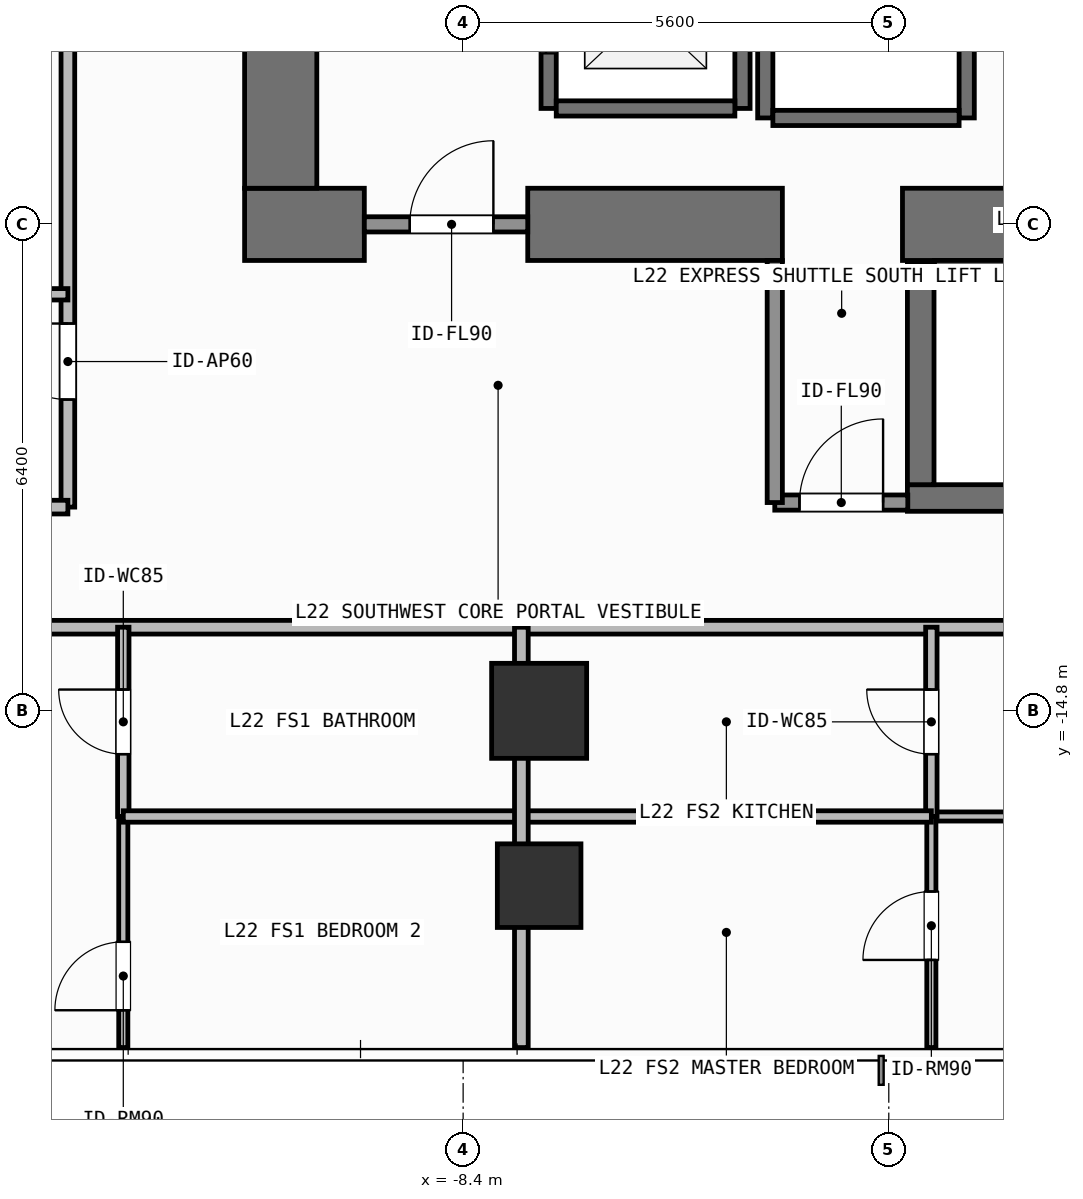
"""IFC4 building model, lengths in metres.
Left out: names, types, materials, properties, quantities, classifications, styles, units other than length and angle.
Written with IfcOpenShell. Run it as: python <this file> out.ifc"""

import sys

from ifc_helpers import new_model, si_unit, direction, frame, frame_2d, origin, origin_2d, place, context, subcontext, project, spatial, rectangle, extrude, element, fill, save


model = new_model("IFC4")
c1 = context("Model", 3, precision=1e-05, world=origin(), true_north=direction((0.0, 1.0)))
c2 = subcontext(c1, "Body", "Model", "MODEL_VIEW")
j1 = project(units=[si_unit("LENGTHUNIT", "METRE"), si_unit("PLANEANGLEUNIT", "RADIAN")], contexts=[c1])
p1 = place(None, origin())
s1 = spatial("IfcSite", under=j1, at=p1, CompositionType="ELEMENT")
p2 = place(p1, origin())
s2 = spatial("IfcBuilding", under=s1, at=p2, CompositionType="ELEMENT")
p3 = place(p2, frame((0.0, 0.0, 89.1)))
s3 = spatial("IfcBuildingStorey", under=s2, at=p3, CompositionType="ELEMENT", Elevation=89.1)
p4 = place(p3, frame((-11.275, -8.4, 0.0), z_axis=(0.0, 0.0, 1.0), x_axis=(1.0, 0.0, 0.0)))
e1 = element("IfcWall", 1, at=p4, inside=s3, PredefinedType="SHEAR", context=c2, shape_type="SweptSolid", body=[
    extrude(rectangle(XDim=1.575, YDim=0.95, at=frame_2d((0.788, 0.0))), origin(), (0.0, 0.0, 1.0), 3.9),
])
p5 = place(p3, frame((-7.55, -8.4, 0.0), z_axis=(0.0, 0.0, 1.0), x_axis=(1.0, 0.0, 0.0)))
e2 = element("IfcWall", 2, at=p5, inside=s3, PredefinedType="SHEAR", context=c2, shape_type="SweptSolid", body=[
    extrude(rectangle(XDim=3.35, YDim=0.95, at=frame_2d((1.675, 0.0))), origin(), (0.0, 0.0, 1.0), 3.9),
])
p6 = place(p3, frame((-2.62, -8.4, 0.0), z_axis=(0.0, 0.0, 1.0), x_axis=(1.0, 0.0, 0.0)))
e3 = element("IfcWall", 3, at=p6, inside=s3, PredefinedType="SHEAR", context=c2, shape_type="SweptSolid", body=[
    extrude(rectangle(XDim=7.27, YDim=0.95, at=frame_2d((3.635, 0.0))), origin(), (0.0, 0.0, 1.0), 3.9),
])
p7 = place(p3, frame((-10.8, -7.925, 0.0), z_axis=(0.0, 0.0, 1.0), x_axis=(0.0, 1.0, 0.0)))
e4 = element("IfcWall", 4, at=p7, inside=s3, PredefinedType="SHEAR", context=c2, shape_type="SweptSolid", body=[
    extrude(rectangle(XDim=15.85, YDim=0.95, at=frame_2d((7.925, 0.0))), origin(), (0.0, 0.0, 1.0), 3.9),
])
p8 = place(p3, frame((-2.555, -12.0, 0.0), z_axis=(0.0, 0.0, 1.0), x_axis=(1.0, 0.0, 0.0)))
e5 = element("IfcWall", 5, at=p8, inside=s3, PredefinedType="SHEAR", context=c2, shape_type="SweptSolid", body=[
    extrude(rectangle(XDim=7.31, YDim=0.35, at=frame_2d((3.655, 0.0))), origin(), (0.0, 0.0, 1.0), 3.9),
])
p9 = place(p3, frame((-2.2, -8.95, 0.0), z_axis=(0.0, 0.0, 1.0), x_axis=(1.0, 0.0, 0.0)))
e6 = element("IfcWall", 6, at=p9, inside=s3, PredefinedType="SHEAR", context=c2, shape_type="SweptSolid", body=[
    extrude(rectangle(XDim=6.6, YDim=0.15, at=frame_2d((3.3, 0.0))), origin(), (0.0, 0.0, 1.0), 3.9),
])
p10 = place(p3, frame((-2.38, -11.825, 0.0), z_axis=(0.0, 0.0, 1.0), x_axis=(0.0, 1.0, 0.0)))
e7 = element("IfcWall", 7, at=p10, inside=s3, PredefinedType="SHEAR", context=c2, shape_type="SweptSolid", body=[
    extrude(rectangle(XDim=2.925, YDim=0.35, at=frame_2d((1.462, 0.0))), origin(), (0.0, 0.0, 1.0), 3.9),
])
p11 = place(p3, frame((-7.4, -14.8, 0.0), z_axis=(0.0, 0.0, 1.0), x_axis=(1.0, 0.0, 0.0)))
e8 = element("IfcColumn", 8, at=p11, inside=s3, PredefinedType="COLUMN", context=c2, shape_type="SweptSolid", body=[
    extrude(rectangle(XDim=1.25, YDim=1.25, at=origin_2d()), origin(), (0.0, 0.0, 1.0), 3.9),
])
p12 = place(p3, frame((-7.4, -17.1, 0.0), z_axis=(0.0, 0.0, 1.0), x_axis=(1.0, 0.0, 0.0)))
e9 = element("IfcColumn", 9, at=p12, inside=s3, PredefinedType="COLUMN", context=c2, shape_type="SweptSolid", body=[
    extrude(rectangle(XDim=1.1, YDim=1.1, at=origin_2d()), origin(), (0.0, 0.0, 1.0), 3.9),
])
p13 = place(p3, frame((-7.275, -6.875, 0.0), z_axis=(0.0, 0.0, 1.0), x_axis=(0.0, 1.0, 0.0)))
e10 = element("IfcWall", 10, at=p13, inside=s3, PredefinedType="SHEAR", context=c2, shape_type="SweptSolid", body=[
    extrude(rectangle(XDim=2.55, YDim=0.2, at=frame_2d((1.275, 0.0))), origin(), (0.0, 0.0, 1.0), 3.68),
])
p14 = place(p13, frame((0.725, 0.0, 0.0)))
e11 = element("IfcOpeningElement", 11, at=p14, cuts=e10, PredefinedType="OPENING", context=c2, shape_type="SweptSolid", body=[
    extrude(rectangle(XDim=1.1, YDim=2.2, at=frame_2d((0.55, 1.1))), frame((0.0, 0.11, 0.0), z_axis=(0.0, -1.0, 0.0), x_axis=(1.0, 0.0, 0.0)), (0.0, 0.0, 1.0), 0.22),
])
p15 = place(p3, frame((-4.725, -6.875, 0.0), z_axis=(0.0, 0.0, 1.0), x_axis=(0.0, 1.0, 0.0)))
e12 = element("IfcWall", 12, at=p15, inside=s3, PredefinedType="SHEAR", context=c2, shape_type="SweptSolid", body=[
    extrude(rectangle(XDim=2.55, YDim=0.2, at=frame_2d((1.275, 0.0))), origin(), (0.0, 0.0, 1.0), 3.68),
])
p16 = place(p3, frame((-7.175, -6.875, 0.0), z_axis=(0.0, 0.0, 1.0), x_axis=(1.0, 0.0, 0.0)))
e13 = element("IfcWall", 13, at=p16, inside=s3, PredefinedType="SHEAR", context=c2, shape_type="SweptSolid", body=[
    extrude(rectangle(XDim=2.35, YDim=0.2, at=frame_2d((1.175, 0.0))), origin(), (0.0, 0.0, 1.0), 3.68),
])
for number, where, z_axis, x_axis in (
    (14, (-4.425, -7.0, 0.0), (0.0, 0.0, 1.0), (0.0, 1.0, 0.0)),
    (15, (-1.775, -7.0, 0.0), (0.0, 0.0, 1.0), (0.0, 1.0, 0.0)),
):
    element("IfcWall", number, at=place(p3, frame(where, z_axis=z_axis, x_axis=x_axis)), inside=s3, PredefinedType="SHEAR", context=c2, shape_type="SweptSolid", body=[
        extrude(rectangle(XDim=2.8, YDim=0.2, at=frame_2d((1.4, 0.0))), origin(), (0.0, 0.0, 1.0), 3.68),
    ])
p17 = place(p3, frame((-4.325, -7.0, 0.0), z_axis=(0.0, 0.0, 1.0), x_axis=(1.0, 0.0, 0.0)))
e16 = element("IfcWall", 16, at=p17, inside=s3, PredefinedType="SHEAR", context=c2, shape_type="SweptSolid", body=[
    extrude(rectangle(XDim=2.45, YDim=0.2, at=frame_2d((1.225, 0.0))), origin(), (0.0, 0.0, 1.0), 3.68),
])
p18 = place(p3, frame((-9.7, -8.4, 0.0), z_axis=(0.0, 0.0, 1.0), x_axis=(1.0, 0.0, 0.0)))
e17 = element("IfcWall", 17, at=p18, inside=s3, PredefinedType="SOLIDWALL", context=c2, shape_type="SweptSolid", body=[
    extrude(rectangle(XDim=2.15, YDim=0.2, at=frame_2d((1.075, 0.0))), origin(), (0.0, 0.0, 1.0), 2.72),
])
p19 = place(p18, frame((0.598, 0.0, 0.0)))
e18 = element("IfcOpeningElement", 18, at=p19, cuts=e17, PredefinedType="OPENING", context=c2, shape_type="SweptSolid", body=[
    extrude(rectangle(XDim=1.1, YDim=2.15, at=frame_2d((0.55, 1.075))), frame((0.0, 0.11, 0.0), z_axis=(0.0, -1.0, 0.0), x_axis=(1.0, 0.0, 0.0)), (0.0, 0.0, 1.0), 0.22),
])
p20 = place(p3, frame((-4.3, -12.06, 0.0), z_axis=(0.0, 0.0, 1.0), x_axis=(1.0, 0.0, 0.0)))
e19 = element("IfcWall", 19, at=p20, inside=s3, PredefinedType="SOLIDWALL", context=c2, shape_type="SweptSolid", body=[
    extrude(rectangle(XDim=1.75, YDim=0.2, at=frame_2d((0.875, 0.0))), origin(), (0.0, 0.0, 1.0), 3.68),
])
p21 = place(p20, frame((0.325, 0.0, 0.0)))
e20 = element("IfcOpeningElement", 20, at=p21, cuts=e19, PredefinedType="OPENING", context=c2, shape_type="SweptSolid", body=[
    extrude(rectangle(XDim=1.1, YDim=2.15, at=frame_2d((0.55, 1.075))), frame((0.0, 0.11, 0.0), z_axis=(0.0, -1.0, 0.0), x_axis=(1.0, 0.0, 0.0)), (0.0, 0.0, 1.0), 0.22),
])
p22 = place(p3, frame((-24.42, -13.7, 0.0), z_axis=(0.0, 0.0, 1.0), x_axis=(1.0, 0.0, 0.0)))
e21 = element("IfcWall", 21, at=p22, inside=s3, PredefinedType="PARTITIONING", context=c2, shape_type="SweptSolid", body=[
    extrude(rectangle(XDim=16.786, YDim=0.18, at=frame_2d((8.393, 0.0))), origin(), (0.0, 0.0, 1.0), 3.68),
])
p23 = place(p22, frame((7.174, 0.0, 0.0)))
e22 = element("IfcOpeningElement", 22, at=p23, cuts=e21, PredefinedType="OPENING", context=c2, shape_type="SweptSolid", body=[
    extrude(rectangle(XDim=1.0, YDim=2.2, at=frame_2d((0.5, 1.1))), frame((0.0, 0.1, 0.0), z_axis=(0.0, -1.0, 0.0), x_axis=(1.0, 0.0, 0.0)), (0.0, 0.0, 1.0), 0.2),
])
p24 = place(p3, frame((-12.871, -16.19, 0.0), z_axis=(0.0, 0.0, 1.0), x_axis=(0.0, 1.0, 0.0)))
e23 = element("IfcWall", 23, at=p24, inside=s3, PredefinedType="PARTITIONING", context=c2, shape_type="SweptSolid", body=[
    extrude(rectangle(XDim=2.49, YDim=0.15, at=frame_2d((1.245, 0.0))), origin(), (0.0, 0.0, 1.0), 3.68),
])
p25 = place(p24, frame((0.82, 0.0, 0.0)))
e24 = element("IfcOpeningElement", 24, at=p25, cuts=e23, PredefinedType="OPENING", context=c2, shape_type="SweptSolid", body=[
    extrude(rectangle(XDim=0.85, YDim=2.1, at=frame_2d((0.425, 1.05))), frame((0.0, 0.085, 0.0), z_axis=(0.0, -1.0, 0.0), x_axis=(1.0, 0.0, 0.0)), (0.0, 0.0, 1.0), 0.17),
])
p26 = place(p3, frame((-12.871, -19.23, 0.0), z_axis=(0.0, 0.0, 1.0), x_axis=(0.0, 1.0, 0.0)))
e25 = element("IfcWall", 25, at=p26, inside=s3, PredefinedType="PARTITIONING", context=c2, shape_type="SweptSolid", body=[
    extrude(rectangle(XDim=3.04, YDim=0.12, at=frame_2d((1.52, 0.0))), origin(), (0.0, 0.0, 1.0), 3.68),
])
p27 = place(p26, frame((0.491, 0.0, 0.0)))
e26 = element("IfcOpeningElement", 26, at=p27, cuts=e25, PredefinedType="OPENING", context=c2, shape_type="SweptSolid", body=[
    extrude(rectangle(XDim=0.9, YDim=2.1, at=frame_2d((0.45, 1.05))), frame((0.0, 0.07, 0.0), z_axis=(0.0, -1.0, 0.0), x_axis=(1.0, 0.0, 0.0)), (0.0, 0.0, 1.0), 0.14),
])
p28 = place(p3, frame((-7.634, -13.7, 0.0), z_axis=(0.0, 0.0, 1.0), x_axis=(1.0, 0.0, 0.0)))
e27 = element("IfcWall", 27, at=p28, inside=s3, PredefinedType="PARTITIONING", context=c2, shape_type="SweptSolid", body=[
    extrude(rectangle(XDim=26.254, YDim=0.18, at=frame_2d((13.127, 0.0))), origin(), (0.0, 0.0, 1.0), 3.68),
])
p29 = place(p28, frame((12.178, 0.0, 0.0)))
e28 = element("IfcOpeningElement", 28, at=p29, cuts=e27, PredefinedType="OPENING", context=c2, shape_type="SweptSolid", body=[
    extrude(rectangle(XDim=1.0, YDim=2.2, at=frame_2d((0.5, 1.1))), frame((0.0, 0.1, 0.0), z_axis=(0.0, -1.0, 0.0), x_axis=(1.0, 0.0, 0.0)), (0.0, 0.0, 1.0), 0.2),
])
p30 = place(p3, frame((-2.24, -16.19, 0.0), z_axis=(0.0, 0.0, 1.0), x_axis=(1.0, 0.0, 0.0)))
e29 = element("IfcWall", 29, at=p30, inside=s3, PredefinedType="PARTITIONING", context=c2, shape_type="SweptSolid", body=[
    extrude(rectangle(XDim=14.654, YDim=0.12, at=frame_2d((7.327, 0.0))), origin(), (0.0, 0.0, 1.0), 3.68),
])
p31 = place(p30, frame((6.787, 0.0, 0.0)))
e30 = element("IfcOpeningElement", 30, at=p31, cuts=e29, PredefinedType="OPENING", context=c2, shape_type="SweptSolid", body=[
    extrude(rectangle(XDim=0.9, YDim=2.1, at=frame_2d((0.45, 1.05))), frame((0.0, 0.07, 0.0), z_axis=(0.0, -1.0, 0.0), x_axis=(1.0, 0.0, 0.0)), (0.0, 0.0, 1.0), 0.14),
])
p32 = place(p3, frame((-2.24, -16.19, 0.0), z_axis=(0.0, 0.0, 1.0), x_axis=(0.0, 1.0, 0.0)))
e31 = element("IfcWall", 31, at=p32, inside=s3, PredefinedType="PARTITIONING", context=c2, shape_type="SweptSolid", body=[
    extrude(rectangle(XDim=2.49, YDim=0.15, at=frame_2d((1.245, 0.0))), origin(), (0.0, 0.0, 1.0), 3.68),
])
p33 = place(p32, frame((0.82, 0.0, 0.0)))
e32 = element("IfcOpeningElement", 32, at=p33, cuts=e31, PredefinedType="OPENING", context=c2, shape_type="SweptSolid", body=[
    extrude(rectangle(XDim=0.85, YDim=2.1, at=frame_2d((0.425, 1.05))), frame((0.0, 0.085, 0.0), z_axis=(0.0, -1.0, 0.0), x_axis=(1.0, 0.0, 0.0)), (0.0, 0.0, 1.0), 0.17),
])
p34 = place(p3, frame((-2.24, -19.23, 0.0), z_axis=(0.0, 0.0, 1.0), x_axis=(0.0, 1.0, 0.0)))
e33 = element("IfcWall", 33, at=p34, inside=s3, PredefinedType="PARTITIONING", context=c2, shape_type="SweptSolid", body=[
    extrude(rectangle(XDim=3.04, YDim=0.12, at=frame_2d((1.52, 0.0))), origin(), (0.0, 0.0, 1.0), 3.68),
])
p35 = place(p34, frame((1.153, 0.0, 0.0)))
e34 = element("IfcOpeningElement", 34, at=p35, cuts=e33, PredefinedType="OPENING", context=c2, shape_type="SweptSolid", body=[
    extrude(rectangle(XDim=0.9, YDim=2.1, at=frame_2d((0.45, 1.05))), frame((0.0, 0.07, 0.0), z_axis=(0.0, -1.0, 0.0), x_axis=(1.0, 0.0, 0.0)), (0.0, 0.0, 1.0), 0.14),
])
p36 = place(p3, frame((-13.6, -12.12, 0.0), z_axis=(0.0, 0.0, 1.0), x_axis=(0.0, 1.0, 0.0)))
e35 = element("IfcWall", 35, at=p36, inside=s3, PredefinedType="PARTITIONING", context=c2, shape_type="SweptSolid", body=[
    extrude(rectangle(XDim=9.389, YDim=0.18, at=frame_2d((4.695, 0.0))), origin(), (0.0, 0.0, 1.0), 3.68),
])
p37 = place(p36, frame((1.415, 0.0, 0.0)))
e36 = element("IfcOpeningElement", 36, at=p37, cuts=e35, PredefinedType="OPENING", context=c2, shape_type="SweptSolid", body=[
    extrude(rectangle(XDim=1.0, YDim=2.2, at=frame_2d((0.5, 1.1))), frame((0.0, 0.1, 0.0), z_axis=(0.0, -1.0, 0.0), x_axis=(1.0, 0.0, 0.0)), (0.0, 0.0, 1.0), 0.2),
])
p38 = place(p3, frame((-16.863, -9.32, 0.0), z_axis=(0.0, 0.0, 1.0), x_axis=(1.0, 0.0, 0.0)))
e37 = element("IfcWall", 37, at=p38, inside=s3, PredefinedType="PARTITIONING", context=c2, shape_type="SweptSolid", body=[
    extrude(rectangle(XDim=3.263, YDim=0.15, at=frame_2d((1.631, 0.0))), origin(), (0.0, 0.0, 1.0), 3.68),
])
p39 = place(p38, frame((0.509, 0.0, 0.0)))
e38 = element("IfcOpeningElement", 38, at=p39, cuts=e37, PredefinedType="OPENING", context=c2, shape_type="SweptSolid", body=[
    extrude(rectangle(XDim=0.85, YDim=2.1, at=frame_2d((0.425, 1.05))), frame((0.0, 0.085, 0.0), z_axis=(0.0, -1.0, 0.0), x_axis=(1.0, 0.0, 0.0)), (0.0, 0.0, 1.0), 0.17),
])
p40 = place(p3, frame((-4.3, -12.06, 0.0), z_axis=(0.0, 0.0, 1.0), x_axis=(0.0, 1.0, 0.0)))
e39 = element("IfcWall", 39, at=p40, inside=s3, PredefinedType="SOLIDWALL", context=c2, shape_type="SweptSolid", body=[
    extrude(rectangle(XDim=3.185, YDim=0.2, at=frame_2d((1.593, 0.0))), origin(), (0.0, 0.0, 1.0), 3.68),
])
p41 = place(p3, frame((-12.871, -16.19, 0.0), z_axis=(0.0, 0.0, 1.0), x_axis=(1.0, 0.0, 0.0)))
e40 = element("IfcWall", 40, at=p41, inside=s3, PredefinedType="PARTITIONING", context=c2, shape_type="SweptSolid", body=[
    extrude(rectangle(XDim=5.237, YDim=0.15, at=frame_2d((2.619, 0.0))), origin(), (0.0, 0.0, 1.0), 3.68),
])
p42 = place(p3, frame((-7.634, -16.19, 0.0), z_axis=(0.0, 0.0, 1.0), x_axis=(1.0, 0.0, 0.0)))
e41 = element("IfcWall", 41, at=p42, inside=s3, PredefinedType="PARTITIONING", context=c2, shape_type="SweptSolid", body=[
    extrude(rectangle(XDim=5.394, YDim=0.15, at=frame_2d((2.697, 0.0))), origin(), (0.0, 0.0, 1.0), 3.68),
])
p43 = place(p3, frame((-7.634, -19.23, 0.0), z_axis=(0.0, 0.0, 1.0), x_axis=(0.0, 1.0, 0.0)))
e42 = element("IfcWall", 42, at=p43, inside=s3, PredefinedType="PARTITIONING", context=c2, shape_type="SweptSolid", body=[
    extrude(rectangle(XDim=5.53, YDim=0.18, at=frame_2d((2.765, 0.0))), origin(), (0.0, 0.0, 1.0), 3.082),
])
p44 = place(p3, frame((-27.93, -12.12, 0.0), z_axis=(0.0, 0.0, 1.0), x_axis=(1.0, 0.0, 0.0)))
e43 = element("IfcWall", 43, at=p44, inside=s3, PredefinedType="PARTITIONING", context=c2, shape_type="SweptSolid", body=[
    extrude(rectangle(XDim=14.33, YDim=0.18, at=frame_2d((7.165, 0.0))), origin(), (0.0, 0.0, 1.0), 3.68),
])
p45 = place(p14, origin())
e44 = element("IfcDoor", 44, at=p45, inside=s3, OperationType="SLIDING_TO_LEFT", PredefinedType="DOOR", context=c2, shape_type="SweptSolid", body=[
    extrude(rectangle(XDim=1.1, YDim=2.2, at=frame_2d((0.55, 1.1))), frame((0.0, 0.025, 0.0), z_axis=(0.0, -1.0, 0.0), x_axis=(1.0, 0.0, 0.0)), (0.0, 0.0, 1.0), 0.05),
])
fill(e11, e44)
p46 = place(p19, origin())
e45 = element("IfcDoor", 45, at=p46, inside=s3, OperationType="SINGLE_SWING_RIGHT", PredefinedType="DOOR", context=c2, shape_type="SweptSolid", body=[
    extrude(rectangle(XDim=1.1, YDim=2.15, at=frame_2d((0.55, 1.075))), frame((0.0, 0.025, 0.0), z_axis=(0.0, -1.0, 0.0), x_axis=(1.0, 0.0, 0.0)), (0.0, 0.0, 1.0), 0.05),
])
fill(e18, e45)
p47 = place(p21, origin())
e46 = element("IfcDoor", 46, at=p47, inside=s3, OperationType="SINGLE_SWING_RIGHT", PredefinedType="DOOR", context=c2, shape_type="SweptSolid", body=[
    extrude(rectangle(XDim=1.1, YDim=2.15, at=frame_2d((0.55, 1.075))), frame((0.0, 0.025, 0.0), z_axis=(0.0, -1.0, 0.0), x_axis=(1.0, 0.0, 0.0)), (0.0, 0.0, 1.0), 0.05),
])
fill(e20, e46)
p48 = place(p25, origin())
e47 = element("IfcDoor", 47, at=p48, inside=s3, OperationType="SINGLE_SWING_RIGHT", PredefinedType="DOOR", context=c2, shape_type="SweptSolid", body=[
    extrude(rectangle(XDim=0.85, YDim=2.1, at=frame_2d((0.425, 1.05))), frame((0.0, 0.025, 0.0), z_axis=(0.0, -1.0, 0.0), x_axis=(1.0, 0.0, 0.0)), (0.0, 0.0, 1.0), 0.05),
])
fill(e24, e47)
p49 = place(p27, origin())
e48 = element("IfcDoor", 48, at=p49, inside=s3, OperationType="SINGLE_SWING_LEFT", PredefinedType="DOOR", context=c2, shape_type="SweptSolid", body=[
    extrude(rectangle(XDim=0.9, YDim=2.1, at=frame_2d((0.45, 1.05))), frame((0.0, 0.025, 0.0), z_axis=(0.0, -1.0, 0.0), x_axis=(1.0, 0.0, 0.0)), (0.0, 0.0, 1.0), 0.05),
])
fill(e26, e48)
p50 = place(p33, origin())
e49 = element("IfcDoor", 49, at=p50, inside=s3, OperationType="SINGLE_SWING_RIGHT", PredefinedType="DOOR", context=c2, shape_type="SweptSolid", body=[
    extrude(rectangle(XDim=0.85, YDim=2.1, at=frame_2d((0.425, 1.05))), frame((0.0, 0.025, 0.0), z_axis=(0.0, -1.0, 0.0), x_axis=(1.0, 0.0, 0.0)), (0.0, 0.0, 1.0), 0.05),
])
fill(e32, e49)
p51 = place(p35, origin())
e50 = element("IfcDoor", 50, at=p51, inside=s3, OperationType="SINGLE_SWING_LEFT", PredefinedType="DOOR", context=c2, shape_type="SweptSolid", body=[
    extrude(rectangle(XDim=0.9, YDim=2.1, at=frame_2d((0.45, 1.05))), frame((0.0, 0.025, 0.0), z_axis=(0.0, -1.0, 0.0), x_axis=(1.0, 0.0, 0.0)), (0.0, 0.0, 1.0), 0.05),
])
fill(e34, e50)
p52 = place(p37, origin())
e51 = element("IfcDoor", 51, at=p52, inside=s3, OperationType="SINGLE_SWING_RIGHT", PredefinedType="DOOR", context=c2, shape_type="SweptSolid", body=[
    extrude(rectangle(XDim=1.0, YDim=2.2, at=frame_2d((0.5, 1.1))), frame((0.0, 0.025, 0.0), z_axis=(0.0, -1.0, 0.0), x_axis=(1.0, 0.0, 0.0)), (0.0, 0.0, 1.0), 0.05),
])
fill(e36, e51)
save(model, sys.argv[1])
